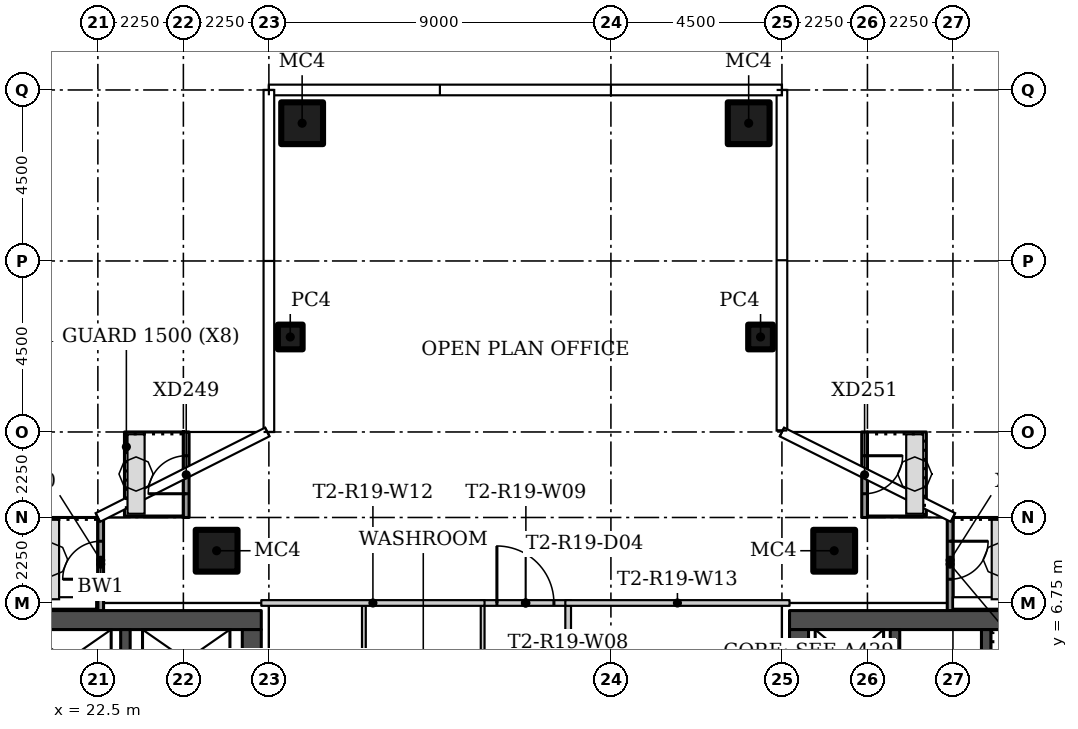
"""IFC4 building model, lengths in metres.
Left out: names, types, materials, properties, quantities, classifications, styles, units other than length and angle.
Written with IfcOpenShell. Run it as: python <this file> out.ifc"""

import sys

from ifc_helpers import new_model, si_unit, direction, frame, frame_2d, origin, origin_2d, place, context, subcontext, project, spatial, rectangle, hollow_rectangle, extrude, element, fill, save


model = new_model("IFC4")
c1 = context("Model", 3, precision=1e-05, world=origin(), true_north=direction((0.0, 1.0)))
c2 = subcontext(c1, "Body", "Model", "MODEL_VIEW")
j1 = project(units=[si_unit("LENGTHUNIT", "METRE"), si_unit("PLANEANGLEUNIT", "RADIAN")], contexts=[c1])
p1 = place(None, origin())
s1 = spatial("IfcSite", under=j1, at=p1, CompositionType="ELEMENT")
p2 = place(p1, origin())
s2 = spatial("IfcBuilding", under=s1, at=p2, CompositionType="ELEMENT")
p3 = place(p2, frame((0.0, 0.0, 170.1)))
s3 = spatial("IfcBuildingStorey", under=s2, at=p3, CompositionType="ELEMENT", Elevation=170.1)
for number, where in (
    (1, (25.625, 8.125, 0.0)),
    (2, (41.875, 8.125, 0.0)),
):
    element("IfcColumn", number, at=place(p3, frame(where)), inside=s3, PredefinedType="COLUMN", context=c2, shape_type="SweptSolid", body=[
        extrude(hollow_rectangle(XDim=1.1, YDim=1.1, WallThickness=0.04, at=origin_2d()), origin(), (0.0, 0.0, 1.0), 3.55),
    ])
p4 = place(p3, frame((39.938, 13.75, 0.0)))
e3 = element("IfcColumn", 3, at=p4, inside=s3, PredefinedType="COLUMN", context=c2, shape_type="SweptSolid", body=[
    extrude(hollow_rectangle(XDim=0.65, YDim=0.65, WallThickness=0.02, at=origin_2d()), origin(), (0.0, 0.0, 1.0), 3.55),
])
p5 = place(p3, frame((39.625, 19.375, 0.0)))
e4 = element("IfcColumn", 4, at=p5, inside=s3, PredefinedType="COLUMN", context=c2, shape_type="SweptSolid", body=[
    extrude(hollow_rectangle(XDim=1.1, YDim=1.1, WallThickness=0.04, at=origin_2d()), origin(), (0.0, 0.0, 1.0), 3.55),
])
p6 = place(p3, frame((27.562, 13.75, 0.0)))
e5 = element("IfcColumn", 5, at=p6, inside=s3, PredefinedType="COLUMN", context=c2, shape_type="SweptSolid", body=[
    extrude(hollow_rectangle(XDim=0.65, YDim=0.65, WallThickness=0.02, at=origin_2d()), origin(), (0.0, 0.0, 1.0), 3.55),
])
p7 = place(p3, frame((27.875, 19.375, 0.0)))
e6 = element("IfcColumn", 6, at=p7, inside=s3, PredefinedType="COLUMN", context=c2, shape_type="SweptSolid", body=[
    extrude(hollow_rectangle(XDim=1.1, YDim=1.1, WallThickness=0.04, at=origin_2d()), origin(), (0.0, 0.0, 1.0), 3.55),
])
p8 = place(p3, frame((32.625, 2.5, 0.0), z_axis=(0.0, 0.0, 1.0), x_axis=(0.0, 1.0, 0.0)))
e7 = element("IfcWall", 7, at=p8, inside=s3, PredefinedType="PARTITIONING", context=c2, shape_type="SweptSolid", body=[
    extrude(rectangle(XDim=4.175, YDim=0.1, at=frame_2d((2.087, 0.0))), origin(), (0.0, 0.0, 1.0), 3.55),
])
p9 = place(p3, frame((34.875, 6.675, 0.0), z_axis=(0.0, 0.0, 1.0), x_axis=(0.0, -1.0, 0.0)))
e8 = element("IfcWall", 8, at=p9, inside=s3, PredefinedType="PARTITIONING", context=c2, shape_type="SweptSolid", body=[
    extrude(rectangle(XDim=4.15, YDim=0.15, at=frame_2d((2.075, 0.0))), origin(), (0.0, 0.0, 1.0), 3.55),
])
p10 = place(p3, frame((32.575, 6.75, 0.0)))
e9 = element("IfcWall", 9, at=p10, inside=s3, PredefinedType="PARTITIONING", context=c2, shape_type="SweptSolid", body=[
    extrude(rectangle(XDim=2.375, YDim=0.15, at=frame_2d((1.188, 0.0))), origin(), (0.0, 0.0, 1.0), 3.55),
])
p11 = place(p10, frame((0.425, 0.0, 0.0)))
e10 = element("IfcOpeningElement", 10, at=p11, cuts=e9, PredefinedType="OPENING", context=c2, shape_type="SweptSolid", body=[
    extrude(rectangle(XDim=1.5, YDim=2.1, at=frame_2d((0.75, 1.05))), frame((0.0, 0.085, 0.0), z_axis=(0.0, -1.0, 0.0), x_axis=(1.0, 0.0, 0.0)), (0.0, 0.0, 1.0), 0.17),
])
p12 = place(p3, frame((29.5, 6.675, 0.0), z_axis=(0.0, 0.0, 1.0), x_axis=(0.0, -1.0, 0.0)))
e11 = element("IfcWall", 11, at=p12, inside=s3, PredefinedType="PARTITIONING", context=c2, shape_type="SweptSolid", body=[
    extrude(rectangle(XDim=4.175, YDim=0.1, at=frame_2d((2.087, 0.0))), origin(), (0.0, 0.0, 1.0), 3.55),
])
p13 = place(p3, frame((32.675, 6.75, 0.0), z_axis=(0.0, 0.0, 1.0), x_axis=(-1.0, 0.0, 0.0)))
e12 = element("IfcWall", 12, at=p13, inside=s3, PredefinedType="PARTITIONING", context=c2, shape_type="SweptSolid", body=[
    extrude(rectangle(XDim=5.875, YDim=0.15, at=frame_2d((2.938, 0.0))), origin(), (0.0, 0.0, 1.0), 3.55),
])
p14 = place(p3, frame((40.7, 6.75, 0.0), z_axis=(0.0, 0.0, 1.0), x_axis=(-1.0, 0.0, 0.0)))
e13 = element("IfcWall", 13, at=p14, inside=s3, PredefinedType="PARTITIONING", context=c2, shape_type="SweptSolid", body=[
    extrude(rectangle(XDim=5.9, YDim=0.15, at=frame_2d((2.95, 0.0))), origin(), (0.0, 0.0, 1.0), 3.55),
])
p15 = place(p3, frame((24.825, 9.0, 0.0), z_axis=(0.0, 0.0, 1.0), x_axis=(0.0, 1.0, 0.0)))
e14 = element("IfcWall", 14, at=p15, inside=s3, PredefinedType="SOLIDWALL", context=c2, shape_type="SweptSolid", body=[
    extrude(rectangle(XDim=2.25, YDim=0.15, at=frame_2d((1.125, 0.0))), origin(), (0.0, 0.0, 1.0), 3.45),
])
p16 = place(p15, frame((0.625, 0.0, 0.0)))
e15 = element("IfcOpeningElement", 15, at=p16, cuts=e14, PredefinedType="OPENING", context=c2, shape_type="SweptSolid", body=[
    extrude(rectangle(XDim=1.0, YDim=2.4, at=frame_2d((0.5, 1.2))), frame((0.0, 0.085, 0.0), z_axis=(0.0, -1.0, 0.0), x_axis=(1.0, 0.0, 0.0)), (0.0, 0.0, 1.0), 0.17),
])
p17 = place(p3, frame((22.575, 6.543, 0.0), z_axis=(0.0, 0.0, 1.0), x_axis=(0.0, 1.0, 0.0)))
e16 = element("IfcWall", 16, at=p17, inside=s3, PredefinedType="SOLIDWALL", context=c2, shape_type="SweptSolid", body=[
    extrude(rectangle(XDim=2.457, YDim=0.15, at=frame_2d((1.229, 0.0))), origin(), (0.0, 0.0, 1.0), 3.45),
])
p18 = place(p17, frame((0.832, 0.0, 0.0)))
e17 = element("IfcOpeningElement", 17, at=p18, cuts=e16, PredefinedType="OPENING", context=c2, shape_type="SweptSolid", body=[
    extrude(rectangle(XDim=1.0, YDim=2.4, at=frame_2d((0.5, 1.2))), frame((0.0, 0.085, 0.0), z_axis=(0.0, -1.0, 0.0), x_axis=(1.0, 0.0, 0.0)), (0.0, 0.0, 1.0), 0.17),
])
p19 = place(p3, frame((42.675, 11.25, 0.0), z_axis=(0.0, 0.0, 1.0), x_axis=(0.0, -1.0, 0.0)))
e18 = element("IfcWall", 18, at=p19, inside=s3, PredefinedType="SOLIDWALL", context=c2, shape_type="SweptSolid", body=[
    extrude(rectangle(XDim=2.25, YDim=0.15, at=frame_2d((1.125, 0.0))), origin(), (0.0, 0.0, 1.0), 3.45),
])
p20 = place(p19, frame((0.625, 0.0, 0.0)))
e19 = element("IfcOpeningElement", 19, at=p20, cuts=e18, PredefinedType="OPENING", context=c2, shape_type="SweptSolid", body=[
    extrude(rectangle(XDim=1.0, YDim=2.4, at=frame_2d((0.5, 1.2))), frame((0.0, 0.085, 0.0), z_axis=(0.0, -1.0, 0.0), x_axis=(1.0, 0.0, 0.0)), (0.0, 0.0, 1.0), 0.17),
])
p21 = place(p3, frame((44.925, 9.0, 0.0), z_axis=(0.0, 0.0, 1.0), x_axis=(0.0, -1.0, 0.0)))
e20 = element("IfcWall", 20, at=p21, inside=s3, PredefinedType="SOLIDWALL", context=c2, shape_type="SweptSolid", body=[
    extrude(rectangle(XDim=2.457, YDim=0.15, at=frame_2d((1.229, 0.0))), origin(), (0.0, 0.0, 1.0), 3.45),
])
p22 = place(p21, frame((0.625, 0.0, 0.0)))
e21 = element("IfcOpeningElement", 21, at=p22, cuts=e20, PredefinedType="OPENING", context=c2, shape_type="SweptSolid", body=[
    extrude(rectangle(XDim=1.0, YDim=2.4, at=frame_2d((0.5, 1.2))), frame((0.0, 0.085, 0.0), z_axis=(0.0, -1.0, 0.0), x_axis=(1.0, 0.0, 0.0)), (0.0, 0.0, 1.0), 0.17),
])
p23 = place(p3, frame((13.7, 6.3, 0.0)))
e22 = element("IfcWall", 22, at=p23, inside=s3, PredefinedType="SHEAR", context=c2, shape_type="SweptSolid", body=[
    extrude(rectangle(XDim=13.1, YDim=0.5, at=frame_2d((6.55, 0.0))), origin(), (0.0, 0.0, 1.0), 3.55),
])
p24 = place(p3, frame((26.55, 6.05, 0.0), z_axis=(0.0, 0.0, 1.0), x_axis=(0.0, -1.0, 0.0)))
e23 = element("IfcWall", 23, at=p24, inside=s3, PredefinedType="SHEAR", context=c2, shape_type="SweptSolid", body=[
    extrude(rectangle(XDim=12.1, YDim=0.5, at=frame_2d((6.05, 0.0))), origin(), (0.0, 0.0, 1.0), 3.55),
])
p25 = place(p24, frame((10.1, 0.0, 0.0)))
e24 = element("IfcOpeningElement", 24, at=p25, cuts=e23, PredefinedType="OPENING", context=c2, shape_type="SweptSolid", body=[
    extrude(rectangle(XDim=1.2, YDim=2.1, at=frame_2d((0.6, 1.05))), frame((0.0, 0.26, 0.0), z_axis=(0.0, -1.0, 0.0), x_axis=(1.0, 0.0, 0.0)), (0.0, 0.0, 1.0), 0.52),
])
p26 = place(p24, frame((3.9, 0.0, 0.0)))
e25 = element("IfcOpeningElement", 25, at=p26, cuts=e23, PredefinedType="OPENING", context=c2, shape_type="SweptSolid", body=[
    extrude(rectangle(XDim=1.8, YDim=2.4, at=frame_2d((0.9, 1.2))), frame((0.0, 0.26, 0.0), z_axis=(0.0, -1.0, 0.0), x_axis=(1.0, 0.0, 0.0)), (0.0, 0.0, 1.0), 0.52),
])
p27 = place(p3, frame((23.225, 3.25, 0.0), z_axis=(0.0, 0.0, 1.0), x_axis=(0.0, 1.0, 0.0)))
e26 = element("IfcWall", 26, at=p27, inside=s3, PredefinedType="SHEAR", context=c2, shape_type="SweptSolid", body=[
    extrude(rectangle(XDim=2.8, YDim=0.25, at=frame_2d((1.4, 0.0))), origin(), (0.0, 0.0, 1.0), 3.55),
])
p28 = place(p3, frame((53.8, 6.3, 0.0), z_axis=(0.0, 0.0, 1.0), x_axis=(-1.0, 0.0, 0.0)))
e27 = element("IfcWall", 27, at=p28, inside=s3, PredefinedType="SHEAR", context=c2, shape_type="SweptSolid", body=[
    extrude(rectangle(XDim=13.1, YDim=0.5, at=frame_2d((6.55, 0.0))), origin(), (0.0, 0.0, 1.0), 3.55),
])
p29 = place(p3, frame((40.95, -6.05, 0.0), z_axis=(0.0, 0.0, 1.0), x_axis=(0.0, 1.0, 0.0)))
e28 = element("IfcWall", 28, at=p29, inside=s3, PredefinedType="SHEAR", context=c2, shape_type="SweptSolid", body=[
    extrude(rectangle(XDim=12.1, YDim=0.5, at=frame_2d((6.05, 0.0))), origin(), (0.0, 0.0, 1.0), 3.55),
])
p30 = place(p29, frame((0.8, 0.0, 0.0)))
e29 = element("IfcOpeningElement", 29, at=p30, cuts=e28, PredefinedType="OPENING", context=c2, shape_type="SweptSolid", body=[
    extrude(rectangle(XDim=1.2, YDim=2.1, at=frame_2d((0.6, 1.05))), frame((0.0, 0.26, 0.0), z_axis=(0.0, -1.0, 0.0), x_axis=(1.0, 0.0, 0.0)), (0.0, 0.0, 1.0), 0.52),
])
p31 = place(p29, frame((6.4, 0.0, 0.0)))
e30 = element("IfcOpeningElement", 30, at=p31, cuts=e28, PredefinedType="OPENING", context=c2, shape_type="SweptSolid", body=[
    extrude(rectangle(XDim=1.8, YDim=2.4, at=frame_2d((0.9, 1.2))), frame((0.0, 0.26, 0.0), z_axis=(0.0, -1.0, 0.0), x_axis=(1.0, 0.0, 0.0)), (0.0, 0.0, 1.0), 0.52),
])
for number, where, z_axis, x_axis in (
    (31, (45.875, 3.25, 0.0), (0.0, 0.0, 1.0), (0.0, 1.0, 0.0)),
    (32, (43.475, 3.25, 0.0), (0.0, 0.0, 1.0), (0.0, 1.0, 0.0)),
):
    element("IfcWall", number, at=place(p3, frame(where, z_axis=z_axis, x_axis=x_axis)), inside=s3, PredefinedType="SHEAR", context=c2, shape_type="SweptSolid", body=[
        extrude(rectangle(XDim=2.8, YDim=0.25, at=frame_2d((1.4, 0.0))), origin(), (0.0, 0.0, 1.0), 3.55),
    ])
p32 = place(p11, origin())
e33 = element("IfcDoor", 33, at=p32, inside=s3, OperationType="DOUBLE_DOOR_SINGLE_SWING", PredefinedType="DOOR", context=c2, shape_type="SweptSolid", body=[
    extrude(rectangle(XDim=1.5, YDim=2.1, at=frame_2d((0.75, 1.05))), frame((0.0, 0.025, 0.0), z_axis=(0.0, -1.0, 0.0), x_axis=(1.0, 0.0, 0.0)), (0.0, 0.0, 1.0), 0.05),
])
fill(e10, e33)
p33 = place(p16, origin())
e34 = element("IfcDoor", 34, at=p33, inside=s3, OperationType="SINGLE_SWING_RIGHT", PredefinedType="DOOR", context=c2, shape_type="SweptSolid", body=[
    extrude(rectangle(XDim=1.0, YDim=2.4, at=frame_2d((0.5, 1.2))), frame((0.0, 0.025, 0.0), z_axis=(0.0, -1.0, 0.0), x_axis=(1.0, 0.0, 0.0)), (0.0, 0.0, 1.0), 0.05),
])
fill(e15, e34)
p34 = place(p18, origin())
e35 = element("IfcDoor", 35, at=p34, inside=s3, OperationType="SINGLE_SWING_LEFT", PredefinedType="DOOR", context=c2, shape_type="SweptSolid", body=[
    extrude(rectangle(XDim=1.0, YDim=2.4, at=frame_2d((0.5, 1.2))), frame((0.0, 0.025, 0.0), z_axis=(0.0, -1.0, 0.0), x_axis=(1.0, 0.0, 0.0)), (0.0, 0.0, 1.0), 0.05),
])
fill(e17, e35)
p35 = place(p20, origin())
e36 = element("IfcDoor", 36, at=p35, inside=s3, OperationType="SINGLE_SWING_RIGHT", PredefinedType="DOOR", context=c2, shape_type="SweptSolid", body=[
    extrude(rectangle(XDim=1.0, YDim=2.4, at=frame_2d((0.5, 1.2))), frame((0.0, 0.025, 0.0), z_axis=(0.0, -1.0, 0.0), x_axis=(1.0, 0.0, 0.0)), (0.0, 0.0, 1.0), 0.05),
])
fill(e19, e36)
p36 = place(p22, origin())
e37 = element("IfcDoor", 37, at=p36, inside=s3, OperationType="SINGLE_SWING_LEFT", PredefinedType="DOOR", context=c2, shape_type="SweptSolid", body=[
    extrude(rectangle(XDim=1.0, YDim=2.4, at=frame_2d((0.5, 1.2))), frame((0.0, 0.025, 0.0), z_axis=(0.0, -1.0, 0.0), x_axis=(1.0, 0.0, 0.0)), (0.0, 0.0, 1.0), 0.05),
])
fill(e21, e37)
save(model, sys.argv[1])
